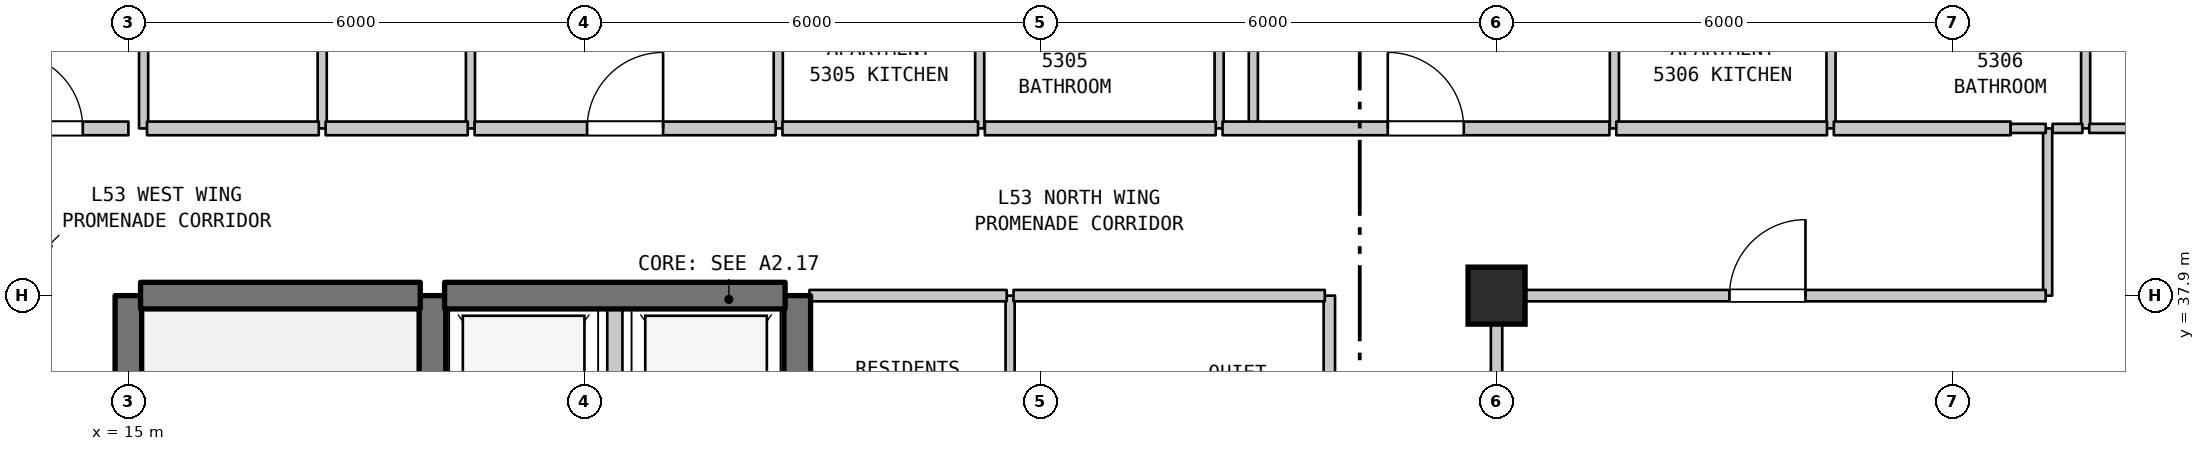
"""IFC4 building model, lengths in metres.
Left out: names, types, materials, properties, quantities, classifications, styles, units other than length and angle.
Written with IfcOpenShell. Run it as: python <this file> out.ifc"""

import sys

from ifc_helpers import new_model, si_unit, direction, frame, frame_2d, origin, origin_2d, place, context, subcontext, project, spatial, rectangle, extrude, element, fill, save


model = new_model("IFC4")
c1 = context("Model", 3, precision=1e-05, world=origin(), true_north=direction((0.0, 1.0)))
c2 = subcontext(c1, "Body", "Model", "MODEL_VIEW")
j1 = project(units=[si_unit("LENGTHUNIT", "METRE"), si_unit("PLANEANGLEUNIT", "RADIAN")], contexts=[c1])
p1 = place(None, origin())
s1 = spatial("IfcSite", under=j1, at=p1, CompositionType="ELEMENT")
p2 = place(p1, origin())
s2 = spatial("IfcBuilding", under=s1, at=p2, CompositionType="ELEMENT")
p3 = place(p2, frame((0.0, 0.0, 214.3)))
s3 = spatial("IfcBuildingStorey", under=s2, at=p3, CompositionType="ELEMENT", Elevation=214.3)
p4 = place(p3, frame((33.0, 37.9, 0.0), z_axis=(0.0, 0.0, 1.0), x_axis=(1.0, 0.0, 0.0)))
e1 = element("IfcColumn", 1, at=p4, inside=s3, PredefinedType="COLUMN", context=c2, shape_type="SweptSolid", body=[
    extrude(rectangle(XDim=0.75, YDim=0.75, at=origin_2d()), origin(), (0.0, 0.0, 1.0), 3.7),
])
p5 = place(p3, frame((15.0, 31.1, 0.0), z_axis=(0.0, 0.0, 1.0), x_axis=(0.0, 1.0, 0.0)))
e2 = element("IfcWall", 2, at=p5, inside=s3, PredefinedType="SHEAR", context=c2, shape_type="SweptSolid", body=[
    extrude(rectangle(XDim=6.8, YDim=0.35, at=frame_2d((3.4, 0.0))), origin(), (0.0, 0.0, 1.0), 3.38),
])
p6 = place(p3, frame((15.2, 40.1, 0.0), z_axis=(0.0, 0.0, 1.0), x_axis=(0.0, 1.0, 0.0)))
e3 = element("IfcWall", 3, at=p6, inside=s3, PredefinedType="PARTITIONING", context=c2, shape_type="SweptSolid", body=[
    extrude(rectangle(XDim=3.2, YDim=0.12, at=frame_2d((1.6, 0.0))), origin(), (0.0, 0.0, 1.0), 3.38),
])
p7 = place(p3, frame((17.55, 40.1, 0.0), z_axis=(0.0, 0.0, 1.0), x_axis=(0.0, 1.0, 0.0)))
e4 = element("IfcWall", 4, at=p7, inside=s3, PredefinedType="PARTITIONING", context=c2, shape_type="SweptSolid", body=[
    extrude(rectangle(XDim=3.2, YDim=0.12, at=frame_2d((1.6, 0.0))), origin(), (0.0, 0.0, 1.0), 3.38),
])
p8 = place(p7, frame((1.15, 0.0, 0.0)))
e5 = element("IfcOpeningElement", 5, at=p8, cuts=e4, PredefinedType="OPENING", context=c2, shape_type="SweptSolid", body=[
    extrude(rectangle(XDim=0.9, YDim=2.15, at=frame_2d((0.45, 1.075))), frame((0.0, 0.07, 0.0), z_axis=(0.0, -1.0, 0.0), x_axis=(1.0, 0.0, 0.0)), (0.0, 0.0, 1.0), 0.14),
])
p9 = place(p3, frame((19.0, 35.0, 0.0), z_axis=(0.0, 0.0, 1.0), x_axis=(0.0, 1.0, 0.0)))
e6 = element("IfcWall", 6, at=p9, inside=s3, PredefinedType="SHEAR", context=c2, shape_type="SweptSolid", body=[
    extrude(rectangle(XDim=2.9, YDim=0.35, at=frame_2d((1.45, 0.0))), origin(), (0.0, 0.0, 1.0), 3.38),
])
p10 = place(p3, frame((19.5, 40.1, 0.0), z_axis=(0.0, 0.0, 1.0), x_axis=(0.0, 1.0, 0.0)))
e7 = element("IfcWall", 7, at=p10, inside=s3, PredefinedType="PARTITIONING", context=c2, shape_type="SweptSolid", body=[
    extrude(rectangle(XDim=13.79, YDim=0.12, at=frame_2d((6.895, 0.0))), origin(), (0.0, 0.0, 1.0), 3.38),
])
p11 = place(p3, frame((21.4, 35.0, 0.0), z_axis=(0.0, 0.0, 1.0), x_axis=(0.0, 1.0, 0.0)))
e8 = element("IfcWall", 8, at=p11, inside=s3, PredefinedType="STANDARD", context=c2, shape_type="SweptSolid", body=[
    extrude(rectangle(XDim=2.9, YDim=0.2, at=frame_2d((1.45, 0.0))), origin(), (0.0, 0.0, 1.0), 3.38),
])
p12 = place(p3, frame((23.55, 40.1, 0.0), z_axis=(0.0, 0.0, 1.0), x_axis=(0.0, 1.0, 0.0)))
e9 = element("IfcWall", 9, at=p12, inside=s3, PredefinedType="PARTITIONING", context=c2, shape_type="SweptSolid", body=[
    extrude(rectangle(XDim=2.3, YDim=0.12, at=frame_2d((1.15, 0.0))), origin(), (0.0, 0.0, 1.0), 3.38),
])
p13 = place(p3, frame((23.8, 35.0, 0.0), z_axis=(0.0, 0.0, 1.0), x_axis=(0.0, 1.0, 0.0)))
e10 = element("IfcWall", 10, at=p13, inside=s3, PredefinedType="SHEAR", context=c2, shape_type="SweptSolid", body=[
    extrude(rectangle(XDim=2.9, YDim=0.35, at=frame_2d((1.45, 0.0))), origin(), (0.0, 0.0, 1.0), 3.38),
])
p14 = place(p3, frame((26.2, 40.1, 0.0), z_axis=(0.0, 0.0, 1.0), x_axis=(0.0, 1.0, 0.0)))
e11 = element("IfcWall", 11, at=p14, inside=s3, PredefinedType="PARTITIONING", context=c2, shape_type="SweptSolid", body=[
    extrude(rectangle(XDim=2.3, YDim=0.12, at=frame_2d((1.15, 0.0))), origin(), (0.0, 0.0, 1.0), 3.38),
])
p15 = place(p3, frame((26.6, 35.0, 0.0), z_axis=(0.0, 0.0, 1.0), x_axis=(0.0, 1.0, 0.0)))
e12 = element("IfcWall", 12, at=p15, inside=s3, PredefinedType="PARTITIONING", context=c2, shape_type="SweptSolid", body=[
    extrude(rectangle(XDim=2.9, YDim=0.12, at=frame_2d((1.45, 0.0))), origin(), (0.0, 0.0, 1.0), 3.38),
])
p16 = place(p3, frame((29.35, 40.1, 0.0), z_axis=(0.0, 0.0, 1.0), x_axis=(0.0, 1.0, 0.0)))
e13 = element("IfcWall", 13, at=p16, inside=s3, PredefinedType="PARTITIONING", context=c2, shape_type="SweptSolid", body=[
    extrude(rectangle(XDim=2.3, YDim=0.12, at=frame_2d((1.15, 0.0))), origin(), (0.0, 0.0, 1.0), 3.38),
])
p17 = place(p3, frame((29.8, 40.1, 0.0), z_axis=(0.0, 0.0, 1.0), x_axis=(0.0, 1.0, 0.0)))
e14 = element("IfcWall", 14, at=p17, inside=s3, PredefinedType="PARTITIONING", context=c2, shape_type="SweptSolid", body=[
    extrude(rectangle(XDim=13.79, YDim=0.12, at=frame_2d((6.895, 0.0))), origin(), (0.0, 0.0, 1.0), 3.38),
])
p18 = place(p3, frame((30.8, 35.0, 0.0), z_axis=(0.0, 0.0, 1.0), x_axis=(0.0, 1.0, 0.0)))
e15 = element("IfcWall", 15, at=p18, inside=s3, PredefinedType="STANDARD", context=c2, shape_type="SweptSolid", body=[
    extrude(rectangle(XDim=2.9, YDim=0.15, at=frame_2d((1.45, 0.0))), origin(), (0.0, 0.0, 1.0), 3.38),
])
p19 = place(p3, frame((33.0, 29.16, 0.0), z_axis=(0.0, 0.0, 1.0), x_axis=(0.0, 1.0, 0.0)))
e16 = element("IfcWall", 16, at=p19, inside=s3, PredefinedType="STANDARD", context=c2, shape_type="SweptSolid", body=[
    extrude(rectangle(XDim=8.74, YDim=0.15, at=frame_2d((4.37, 0.0))), origin(), (0.0, 0.0, 1.0), 2.88),
])
p20 = place(p19, frame((3.799, 0.0, 0.0)))
e17 = element("IfcOpeningElement", 17, at=p20, cuts=e16, PredefinedType="OPENING", context=c2, shape_type="SweptSolid", body=[
    extrude(rectangle(XDim=1.0, YDim=2.15, at=frame_2d((0.5, 1.075))), frame((0.0, 0.085, 0.0), z_axis=(0.0, -1.0, 0.0), x_axis=(1.0, 0.0, 0.0)), (0.0, 0.0, 1.0), 0.17),
])
for number, where, z_axis, x_axis in (
    (18, (34.55, 40.1, 0.0), (0.0, 0.0, 1.0), (0.0, 1.0, 0.0)),
    (19, (37.4, 40.1, 0.0), (0.0, 0.0, 1.0), (0.0, 1.0, 0.0)),
):
    element("IfcWall", number, at=place(p3, frame(where, z_axis=z_axis, x_axis=x_axis)), inside=s3, PredefinedType="PARTITIONING", context=c2, shape_type="SweptSolid", body=[
        extrude(rectangle(XDim=2.3, YDim=0.12, at=frame_2d((1.15, 0.0))), origin(), (0.0, 0.0, 1.0), 3.38),
    ])
p21 = place(p3, frame((40.25, 37.9, 0.0), z_axis=(0.0, 0.0, 1.0), x_axis=(0.0, 1.0, 0.0)))
e20 = element("IfcWall", 20, at=p21, inside=s3, PredefinedType="PARTITIONING", context=c2, shape_type="SweptSolid", body=[
    extrude(rectangle(XDim=2.2, YDim=0.12, at=frame_2d((1.1, 0.0))), origin(), (0.0, 0.0, 1.0), 3.38),
])
p22 = place(p3, frame((40.75, 40.1, 0.0), z_axis=(0.0, 0.0, 1.0), x_axis=(0.0, 1.0, 0.0)))
e21 = element("IfcWall", 21, at=p22, inside=s3, PredefinedType="PARTITIONING", context=c2, shape_type="SweptSolid", body=[
    extrude(rectangle(XDim=2.3, YDim=0.12, at=frame_2d((1.15, 0.0))), origin(), (0.0, 0.0, 1.0), 3.38),
])
p23 = place(p3, frame((15.16, 37.9, 0.0), z_axis=(0.0, 0.0, 1.0), x_axis=(1.0, 0.0, 0.0)))
e22 = element("IfcWall", 22, at=p23, inside=s3, PredefinedType="SHEAR", context=c2, shape_type="SweptSolid", body=[
    extrude(rectangle(XDim=3.68, YDim=0.35, at=frame_2d((1.84, 0.0))), origin(), (0.0, 0.0, 1.0), 3.38),
])
p24 = place(p3, frame((19.16, 37.9, 0.0), z_axis=(0.0, 0.0, 1.0), x_axis=(1.0, 0.0, 0.0)))
e23 = element("IfcWall", 23, at=p24, inside=s3, PredefinedType="SHEAR", context=c2, shape_type="SweptSolid", body=[
    extrude(rectangle(XDim=4.48, YDim=0.35, at=frame_2d((2.24, 0.0))), origin(), (0.0, 0.0, 1.0), 3.38),
])
p25 = place(p3, frame((23.96, 37.9, 0.0), z_axis=(0.0, 0.0, 1.0), x_axis=(1.0, 0.0, 0.0)))
e24 = element("IfcWall", 24, at=p25, inside=s3, PredefinedType="STANDARD", context=c2, shape_type="SweptSolid", body=[
    extrude(rectangle(XDim=2.595, YDim=0.15, at=frame_2d((1.297, 0.0))), origin(), (0.0, 0.0, 1.0), 2.88),
])
p26 = place(p3, frame((26.645, 37.9, 0.0), z_axis=(0.0, 0.0, 1.0), x_axis=(1.0, 0.0, 0.0)))
e25 = element("IfcWall", 25, at=p26, inside=s3, PredefinedType="STANDARD", context=c2, shape_type="SweptSolid", body=[
    extrude(rectangle(XDim=4.095, YDim=0.15, at=frame_2d((2.047, 0.0))), origin(), (0.0, 0.0, 1.0), 2.88),
])
p27 = place(p3, frame((33.06, 37.9, 0.0), z_axis=(0.0, 0.0, 1.0), x_axis=(1.0, 0.0, 0.0)))
e26 = element("IfcWall", 26, at=p27, inside=s3, PredefinedType="STANDARD", context=c2, shape_type="SweptSolid", body=[
    extrude(rectangle(XDim=7.164, YDim=0.15, at=frame_2d((3.582, 0.0))), origin(), (0.0, 0.0, 1.0), 3.38),
])
p28 = place(p27, frame((3.004, 0.0, 0.0)))
e27 = element("IfcOpeningElement", 27, at=p28, cuts=e26, PredefinedType="OPENING", context=c2, shape_type="SweptSolid", body=[
    extrude(rectangle(XDim=1.0, YDim=2.15, at=frame_2d((0.5, 1.075))), frame((0.0, 0.085, 0.0), z_axis=(0.0, -1.0, 0.0), x_axis=(1.0, 0.0, 0.0)), (0.0, 0.0, 1.0), 0.17),
])
p29 = place(p3, frame((12.875, 40.1, 0.0), z_axis=(0.0, 0.0, 1.0), x_axis=(1.0, 0.0, 0.0)))
e28 = element("IfcWall", 28, at=p29, inside=s3, PredefinedType="STANDARD", context=c2, shape_type="SweptSolid", body=[
    extrude(rectangle(XDim=2.125, YDim=0.18, at=frame_2d((1.062, 0.0))), origin(), (0.0, 0.0, 1.0), 3.38),
])
p30 = place(p29, frame((0.525, 0.0, 0.0)))
e29 = element("IfcOpeningElement", 29, at=p30, cuts=e28, PredefinedType="OPENING", context=c2, shape_type="SweptSolid", body=[
    extrude(rectangle(XDim=1.0, YDim=2.15, at=frame_2d((0.5, 1.075))), frame((0.0, 0.1, 0.0), z_axis=(0.0, -1.0, 0.0), x_axis=(1.0, 0.0, 0.0)), (0.0, 0.0, 1.0), 0.2),
])
p31 = place(p3, frame((15.245, 40.1, 0.0), z_axis=(0.0, 0.0, 1.0), x_axis=(1.0, 0.0, 0.0)))
e30 = element("IfcWall", 30, at=p31, inside=s3, PredefinedType="STANDARD", context=c2, shape_type="SweptSolid", body=[
    extrude(rectangle(XDim=2.26, YDim=0.18, at=frame_2d((1.13, 0.0))), origin(), (0.0, 0.0, 1.0), 3.38),
])
p32 = place(p3, frame((17.595, 40.1, 0.0), z_axis=(0.0, 0.0, 1.0), x_axis=(1.0, 0.0, 0.0)))
e31 = element("IfcWall", 31, at=p32, inside=s3, PredefinedType="STANDARD", context=c2, shape_type="SweptSolid", body=[
    extrude(rectangle(XDim=1.87, YDim=0.18, at=frame_2d((0.935, 0.0))), origin(), (0.0, 0.0, 1.0), 3.38),
])
p33 = place(p3, frame((19.555, 40.1, 0.0), z_axis=(0.0, 0.0, 1.0), x_axis=(1.0, 0.0, 0.0)))
e32 = element("IfcWall", 32, at=p33, inside=s3, PredefinedType="STANDARD", context=c2, shape_type="SweptSolid", body=[
    extrude(rectangle(XDim=3.96, YDim=0.18, at=frame_2d((1.98, 0.0))), origin(), (0.0, 0.0, 1.0), 3.38),
])
p34 = place(p33, frame((1.48, 0.0, 0.0)))
e33 = element("IfcOpeningElement", 33, at=p34, cuts=e32, PredefinedType="OPENING", context=c2, shape_type="SweptSolid", body=[
    extrude(rectangle(XDim=1.0, YDim=2.15, at=frame_2d((0.5, 1.075))), frame((0.0, 0.1, 0.0), z_axis=(0.0, -1.0, 0.0), x_axis=(1.0, 0.0, 0.0)), (0.0, 0.0, 1.0), 0.2),
])
p35 = place(p3, frame((23.605, 40.1, 0.0), z_axis=(0.0, 0.0, 1.0), x_axis=(1.0, 0.0, 0.0)))
e34 = element("IfcWall", 34, at=p35, inside=s3, PredefinedType="STANDARD", context=c2, shape_type="SweptSolid", body=[
    extrude(rectangle(XDim=2.573, YDim=0.18, at=frame_2d((1.287, 0.0))), origin(), (0.0, 0.0, 1.0), 3.38),
])
p36 = place(p3, frame((26.268, 40.1, 0.0), z_axis=(0.0, 0.0, 1.0), x_axis=(1.0, 0.0, 0.0)))
e35 = element("IfcWall", 35, at=p36, inside=s3, PredefinedType="STANDARD", context=c2, shape_type="SweptSolid", body=[
    extrude(rectangle(XDim=3.037, YDim=0.18, at=frame_2d((1.519, 0.0))), origin(), (0.0, 0.0, 1.0), 3.38),
])
p37 = place(p3, frame((29.395, 40.1, 0.0), z_axis=(0.0, 0.0, 1.0), x_axis=(1.0, 0.0, 0.0)))
e36 = element("IfcWall", 36, at=p37, inside=s3, PredefinedType="STANDARD", context=c2, shape_type="SweptSolid", body=[
    extrude(rectangle(XDim=5.09, YDim=0.18, at=frame_2d((2.545, 0.0))), origin(), (0.0, 0.0, 1.0), 3.38),
])
p38 = place(p37, frame((2.174, 0.0, 0.0)))
e37 = element("IfcOpeningElement", 37, at=p38, cuts=e36, PredefinedType="OPENING", context=c2, shape_type="SweptSolid", body=[
    extrude(rectangle(XDim=1.0, YDim=2.15, at=frame_2d((0.5, 1.075))), frame((0.0, 0.1, 0.0), z_axis=(0.0, -1.0, 0.0), x_axis=(1.0, 0.0, 0.0)), (0.0, 0.0, 1.0), 0.2),
])
p39 = place(p3, frame((34.575, 40.1, 0.0), z_axis=(0.0, 0.0, 1.0), x_axis=(1.0, 0.0, 0.0)))
e38 = element("IfcWall", 38, at=p39, inside=s3, PredefinedType="STANDARD", context=c2, shape_type="SweptSolid", body=[
    extrude(rectangle(XDim=2.772, YDim=0.18, at=frame_2d((1.386, 0.0))), origin(), (0.0, 0.0, 1.0), 3.38),
])
p40 = place(p3, frame((37.437, 40.1, 0.0), z_axis=(0.0, 0.0, 1.0), x_axis=(1.0, 0.0, 0.0)))
e39 = element("IfcWall", 39, at=p40, inside=s3, PredefinedType="STANDARD", context=c2, shape_type="SweptSolid", body=[
    extrude(rectangle(XDim=2.326, YDim=0.18, at=frame_2d((1.163, 0.0))), origin(), (0.0, 0.0, 1.0), 3.38),
])
p41 = place(p3, frame((39.763, 40.1, 0.0), z_axis=(0.0, 0.0, 1.0), x_axis=(1.0, 0.0, 0.0)))
e40 = element("IfcWall", 40, at=p41, inside=s3, PredefinedType="PARTITIONING", context=c2, shape_type="SweptSolid", body=[
    extrude(rectangle(XDim=0.462, YDim=0.12, at=frame_2d((0.231, 0.0))), origin(), (0.0, 0.0, 1.0), 3.38),
])
p42 = place(p3, frame((40.315, 40.1, 0.0), z_axis=(0.0, 0.0, 1.0), x_axis=(1.0, 0.0, 0.0)))
e41 = element("IfcWall", 41, at=p42, inside=s3, PredefinedType="PARTITIONING", context=c2, shape_type="SweptSolid", body=[
    extrude(rectangle(XDim=0.392, YDim=0.12, at=frame_2d((0.196, 0.0))), origin(), (0.0, 0.0, 1.0), 3.38),
])
p43 = place(p3, frame((40.797, 40.1, 0.0), z_axis=(0.0, 0.0, 1.0), x_axis=(1.0, 0.0, 0.0)))
e42 = element("IfcWall", 42, at=p43, inside=s3, PredefinedType="PARTITIONING", context=c2, shape_type="SweptSolid", body=[
    extrude(rectangle(XDim=1.378, YDim=0.12, at=frame_2d((0.689, 0.0))), origin(), (0.0, 0.0, 1.0), 3.38),
])
p44 = place(p28, origin())
e43 = element("IfcDoor", 43, at=p44, inside=s3, OperationType="SINGLE_SWING_RIGHT", PredefinedType="DOOR", context=c2, shape_type="SweptSolid", body=[
    extrude(rectangle(XDim=1.0, YDim=2.15, at=frame_2d((0.5, 1.075))), frame((0.0, 0.025, 0.0), z_axis=(0.0, -1.0, 0.0), x_axis=(1.0, 0.0, 0.0)), (0.0, 0.0, 1.0), 0.05),
])
fill(e27, e43)
p45 = place(p30, origin())
e44 = element("IfcDoor", 44, at=p45, inside=s3, OperationType="SINGLE_SWING_LEFT", PredefinedType="DOOR", context=c2, shape_type="SweptSolid", body=[
    extrude(rectangle(XDim=1.0, YDim=2.15, at=frame_2d((0.5, 1.075))), frame((0.0, 0.025, 0.0), z_axis=(0.0, -1.0, 0.0), x_axis=(1.0, 0.0, 0.0)), (0.0, 0.0, 1.0), 0.05),
])
fill(e29, e44)
p46 = place(p34, origin())
e45 = element("IfcDoor", 45, at=p46, inside=s3, OperationType="SINGLE_SWING_RIGHT", PredefinedType="DOOR", context=c2, shape_type="SweptSolid", body=[
    extrude(rectangle(XDim=1.0, YDim=2.15, at=frame_2d((0.5, 1.075))), frame((0.0, 0.025, 0.0), z_axis=(0.0, -1.0, 0.0), x_axis=(1.0, 0.0, 0.0)), (0.0, 0.0, 1.0), 0.05),
])
fill(e33, e45)
p47 = place(p38, origin())
e46 = element("IfcDoor", 46, at=p47, inside=s3, OperationType="SINGLE_SWING_LEFT", PredefinedType="DOOR", context=c2, shape_type="SweptSolid", body=[
    extrude(rectangle(XDim=1.0, YDim=2.15, at=frame_2d((0.5, 1.075))), frame((0.0, 0.025, 0.0), z_axis=(0.0, -1.0, 0.0), x_axis=(1.0, 0.0, 0.0)), (0.0, 0.0, 1.0), 0.05),
])
fill(e37, e46)
save(model, sys.argv[1])
